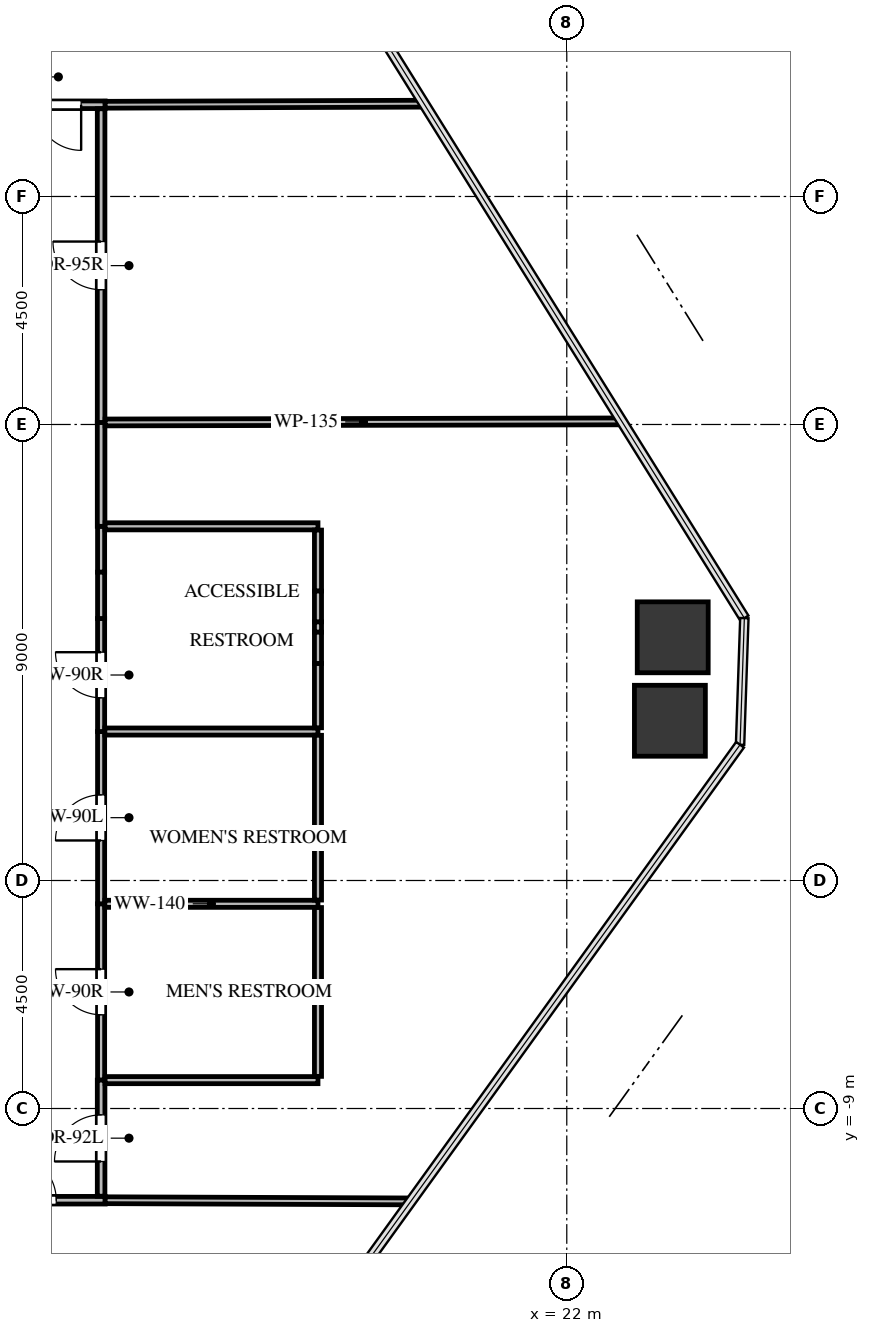
"""IFC4 building model, lengths in metres.
Left out: names, types, materials, properties, quantities, classifications, styles, units other than length and angle.
Written with IfcOpenShell. Run it as: python <this file> out.ifc"""

import sys

from ifc_helpers import new_model, si_unit, direction, frame, frame_2d, origin, origin_2d, place, context, subcontext, project, spatial, rectangle, extrude, source, transform, mapped, element, fill, save


model = new_model("IFC4")
c1 = context("Model", 3, precision=1e-05, world=origin(), true_north=direction((0.0, 1.0)))
c2 = subcontext(c1, "Body", "Model", "MODEL_VIEW")
j1 = project(units=[si_unit("LENGTHUNIT", "METRE"), si_unit("PLANEANGLEUNIT", "RADIAN")], contexts=[c1])
p1 = place(None, origin())
s1 = spatial("IfcSite", under=j1, at=p1, CompositionType="ELEMENT")
p2 = place(p1, origin())
s2 = spatial("IfcBuilding", under=s1, at=p2, CompositionType="ELEMENT")
p3 = place(p2, frame((0.0, 0.0, 39.0)))
s3 = spatial("IfcBuildingStorey", under=s2, at=p3, CompositionType="ELEMENT", Elevation=39.0)
m1 = source(origin(), c2, "Body", "SweptSolid", [
    extrude(rectangle(XDim=1.4, YDim=1.4, at=origin_2d()), origin(), (0.0, 0.0, 1.0), 3.3),
])
for number, where, z_axis, x_axis in (
    (1, (24.091, 0.3, -0.24), (0.0, 0.0, 1.0), (1.0, 0.0, 0.0)),
    (2, (24.035, -1.347, -0.24), (0.0, 0.0, 1.0), (1.0, 0.0, 0.0)),
):
    element("IfcColumn", number, at=place(p3, frame(where, z_axis=z_axis, x_axis=x_axis)), inside=s3, PredefinedType="COLUMN", context=c2, shape_type="MappedRepresentation", body=[
        mapped(m1, transform((0.0, 0.0, 0.0), x_axis=(1.0, 0.0, 0.0), y_axis=(0.0, 1.0, 0.0), z_axis=(0.0, 0.0, 1.0), scale=1.0)),
    ])
p4 = place(p3, frame((12.81, -8.44, 0.0), z_axis=(0.0, 0.0, 1.0), x_axis=(0.0, 1.0, 0.0)))
e3 = element("IfcWall", 3, at=p4, inside=s3, PredefinedType="PARTITIONING", context=c2, shape_type="SweptSolid", body=[
    extrude(rectangle(XDim=3.48, YDim=0.14, at=frame_2d((1.74, 0.0))), origin(), (0.0, 0.0, 1.0), 3.045),
])
p5 = place(p4, frame((1.29, 0.0, 0.0)))
e4 = element("IfcOpeningElement", 4, at=p5, cuts=e3, PredefinedType="OPENING", context=c2, shape_type="SweptSolid", body=[
    extrude(rectangle(XDim=0.9, YDim=2.05, at=frame_2d((0.45, 1.025))), frame((0.0, 0.08, 0.0), z_axis=(0.0, -1.0, 0.0), x_axis=(1.0, 0.0, 0.0)), (0.0, 0.0, 1.0), 0.16),
])
p6 = place(p3, frame((12.81, -4.96, 0.0), z_axis=(0.0, 0.0, 1.0), x_axis=(0.0, 1.0, 0.0)))
e5 = element("IfcWall", 5, at=p6, inside=s3, PredefinedType="PARTITIONING", context=c2, shape_type="SweptSolid", body=[
    extrude(rectangle(XDim=3.4, YDim=0.14, at=frame_2d((1.7, 0.0))), origin(), (0.0, 0.0, 1.0), 3.045),
])
p7 = place(p6, frame((1.25, 0.0, 0.0)))
e6 = element("IfcOpeningElement", 6, at=p7, cuts=e5, PredefinedType="OPENING", context=c2, shape_type="SweptSolid", body=[
    extrude(rectangle(XDim=0.9, YDim=2.05, at=frame_2d((0.45, 1.025))), frame((0.0, 0.08, 0.0), z_axis=(0.0, -1.0, 0.0), x_axis=(1.0, 0.0, 0.0)), (0.0, 0.0, 1.0), 0.16),
])
p8 = place(p3, frame((12.81, -1.56, 0.0), z_axis=(0.0, 0.0, 1.0), x_axis=(0.0, 1.0, 0.0)))
e7 = element("IfcWall", 7, at=p8, inside=s3, PredefinedType="PARTITIONING", context=c2, shape_type="SweptSolid", body=[
    extrude(rectangle(XDim=2.231, YDim=0.14, at=frame_2d((1.116, 0.0))), origin(), (0.0, 0.0, 1.0), 3.045),
])
p9 = place(p8, frame((0.666, 0.0, 0.0)))
e8 = element("IfcOpeningElement", 8, at=p9, cuts=e7, PredefinedType="OPENING", context=c2, shape_type="SweptSolid", body=[
    extrude(rectangle(XDim=0.9, YDim=2.05, at=frame_2d((0.45, 1.025))), frame((0.0, 0.08, 0.0), z_axis=(0.0, -1.0, 0.0), x_axis=(1.0, 0.0, 0.0)), (0.0, 0.0, 1.0), 0.16),
])
p10 = place(p3, frame((12.81, 1.585, 0.0), z_axis=(0.0, 0.0, 1.0), x_axis=(0.0, 1.0, 0.0)))
e9 = element("IfcWall", 9, at=p10, inside=s3, PredefinedType="PARTITIONING", context=c2, shape_type="SweptSolid", body=[
    extrude(rectangle(XDim=0.905, YDim=0.14, at=frame_2d((0.453, 0.0))), origin(), (0.0, 0.0, 1.0), 3.045),
])
p11 = place(p3, frame((12.81, 0.671, 0.0), z_axis=(0.0, 0.0, 1.0), x_axis=(0.0, 1.0, 0.0)))
e10 = element("IfcWall", 10, at=p11, inside=s3, PredefinedType="PARTITIONING", context=c2, shape_type="SweptSolid", body=[
    extrude(rectangle(XDim=0.914, YDim=0.14, at=frame_2d((0.457, 0.0))), origin(), (0.0, 0.0, 1.0), 2.13),
])
p12 = place(p3, frame((12.89, 10.81, 0.0), z_axis=(0.0, 0.0, 1.0), x_axis=(-1.0, 0.0, 0.0)))
e11 = element("IfcWall", 11, at=p12, inside=s3, PredefinedType="PARTITIONING", context=c2, shape_type="SweptSolid", body=[
    extrude(rectangle(XDim=1.847, YDim=0.15, at=frame_2d((0.924, 0.0))), origin(), (0.0, 0.0, 1.0), 3.045),
])
p13 = place(p12, frame((0.474, 0.0, 0.0)))
e12 = element("IfcOpeningElement", 12, at=p13, cuts=e11, PredefinedType="OPENING", context=c2, shape_type="SweptSolid", body=[
    extrude(rectangle(XDim=0.9, YDim=2.05, at=frame_2d((0.45, 1.025))), frame((0.0, 0.085, 0.0), z_axis=(0.0, -1.0, 0.0), x_axis=(1.0, 0.0, 0.0)), (0.0, 0.0, 1.0), 0.17),
])
p14 = place(p3, frame((10.04, -10.81, 0.0), z_axis=(0.0, 0.0, 1.0), x_axis=(1.0, 0.0, 0.0)))
e13 = element("IfcWall", 13, at=p14, inside=s3, PredefinedType="PARTITIONING", context=c2, shape_type="SweptSolid", body=[
    extrude(rectangle(XDim=2.85, YDim=0.15, at=frame_2d((1.425, 0.0))), origin(), (0.0, 0.0, 1.0), 3.045),
])
p15 = place(p14, frame((0.965, 0.0, 0.0)))
e14 = element("IfcOpeningElement", 14, at=p15, cuts=e13, PredefinedType="OPENING", context=c2, shape_type="SweptSolid", body=[
    extrude(rectangle(XDim=0.92, YDim=2.1, at=frame_2d((0.46, 1.05))), frame((0.0, 0.085, 0.0), z_axis=(0.0, -1.0, 0.0), x_axis=(1.0, 0.0, 0.0)), (0.0, 0.0, 1.0), 0.17),
])
p16 = place(p3, frame((12.81, -10.731, 0.0), z_axis=(0.0, 0.0, 1.0), x_axis=(0.0, 1.0, 0.0)))
e15 = element("IfcWall", 15, at=p16, inside=s3, PredefinedType="PARTITIONING", context=c2, shape_type="SweptSolid", body=[
    extrude(rectangle(XDim=2.291, YDim=0.15, at=frame_2d((1.146, 0.0))), origin(), (0.0, 0.0, 1.0), 3.045),
])
p17 = place(p16, frame((0.686, 0.0, 0.0)))
e16 = element("IfcOpeningElement", 16, at=p17, cuts=e15, PredefinedType="OPENING", context=c2, shape_type="SweptSolid", body=[
    extrude(rectangle(XDim=0.92, YDim=2.1, at=frame_2d((0.46, 1.05))), frame((0.0, 0.085, 0.0), z_axis=(0.0, -1.0, 0.0), x_axis=(1.0, 0.0, 0.0)), (0.0, 0.0, 1.0), 0.17),
])
p18 = place(p3, frame((12.81, 2.49, 0.0), z_axis=(0.0, 0.0, 1.0), x_axis=(0.0, 1.0, 0.0)))
e17 = element("IfcWall", 17, at=p18, inside=s3, PredefinedType="PARTITIONING", context=c2, shape_type="SweptSolid", body=[
    extrude(rectangle(XDim=2.05, YDim=0.15, at=frame_2d((1.025, 0.0))), origin(), (0.0, 0.0, 1.0), 3.045),
])
p19 = place(p3, frame((12.81, 4.54, 0.0), z_axis=(0.0, 0.0, 1.0), x_axis=(0.0, 1.0, 0.0)))
e18 = element("IfcWall", 18, at=p19, inside=s3, PredefinedType="PARTITIONING", context=c2, shape_type="SweptSolid", body=[
    extrude(rectangle(XDim=6.191, YDim=0.15, at=frame_2d((3.095, 0.0))), origin(), (0.0, 0.0, 1.0), 3.045),
])
p20 = place(p19, frame((2.621, 0.0, 0.0)))
e19 = element("IfcOpeningElement", 19, at=p20, cuts=e18, PredefinedType="OPENING", context=c2, shape_type="SweptSolid", body=[
    extrude(rectangle(XDim=0.95, YDim=2.1, at=frame_2d((0.475, 1.05))), frame((0.0, 0.085, 0.0), z_axis=(0.0, -1.0, 0.0), x_axis=(1.0, 0.0, 0.0)), (0.0, 0.0, 1.0), 0.17),
])
p21 = place(p3, frame((12.884, -4.96, 0.0), z_axis=(0.0, 0.0, 1.0), x_axis=(1.0, 0.0, 0.0)))
e20 = element("IfcWall", 20, at=p21, inside=s3, PredefinedType="PARTITIONING", context=c2, shape_type="SweptSolid", body=[
    extrude(rectangle(XDim=4.206, YDim=0.14, at=frame_2d((2.103, 0.0))), origin(), (0.0, 0.0, 1.0), 3.045),
])
p22 = place(p3, frame((17.09, -8.44, 0.0), z_axis=(0.0, 0.0, 1.0), x_axis=(-1.0, 0.0, 0.0)))
e21 = element("IfcWall", 21, at=p22, inside=s3, PredefinedType="PARTITIONING", context=c2, shape_type="SweptSolid", body=[
    extrude(rectangle(XDim=4.201, YDim=0.14, at=frame_2d((2.101, 0.0))), origin(), (0.0, 0.0, 1.0), 3.045),
])
p23 = place(p3, frame((17.09, -5.034, 0.0), z_axis=(0.0, 0.0, 1.0), x_axis=(0.0, -1.0, 0.0)))
e22 = element("IfcWall", 22, at=p23, inside=s3, PredefinedType="PARTITIONING", context=c2, shape_type="SweptSolid", body=[
    extrude(rectangle(XDim=3.332, YDim=0.14, at=frame_2d((1.666, 0.0))), origin(), (0.0, 0.0, 1.0), 3.045),
])
p24 = place(p3, frame((12.884, -1.56, 0.0), z_axis=(0.0, 0.0, 1.0), x_axis=(1.0, 0.0, 0.0)))
e23 = element("IfcWall", 23, at=p24, inside=s3, PredefinedType="PARTITIONING", context=c2, shape_type="SweptSolid", body=[
    extrude(rectangle(XDim=4.206, YDim=0.14, at=frame_2d((2.103, 0.0))), origin(), (0.0, 0.0, 1.0), 3.045),
])
p25 = place(p3, frame((17.09, -1.634, 0.0), z_axis=(0.0, 0.0, 1.0), x_axis=(0.0, -1.0, 0.0)))
e24 = element("IfcWall", 24, at=p25, inside=s3, PredefinedType="PARTITIONING", context=c2, shape_type="SweptSolid", body=[
    extrude(rectangle(XDim=3.252, YDim=0.14, at=frame_2d((1.626, 0.0))), origin(), (0.0, 0.0, 1.0), 3.045),
])
p26 = place(p3, frame((12.889, 2.49, 0.0), z_axis=(0.0, 0.0, 1.0), x_axis=(1.0, 0.0, 0.0)))
e25 = element("IfcWall", 25, at=p26, inside=s3, PredefinedType="PARTITIONING", context=c2, shape_type="SweptSolid", body=[
    extrude(rectangle(XDim=4.201, YDim=0.14, at=frame_2d((2.101, 0.0))), origin(), (0.0, 0.0, 1.0), 3.045),
])
p27 = place(p3, frame((17.09, 2.416, 0.0), z_axis=(0.0, 0.0, 1.0), x_axis=(0.0, -1.0, 0.0)))
e26 = element("IfcWall", 26, at=p27, inside=s3, PredefinedType="PARTITIONING", context=c2, shape_type="SweptSolid", body=[
    extrude(rectangle(XDim=1.204, YDim=0.14, at=frame_2d((0.602, 0.0))), origin(), (0.0, 0.0, 1.0), 3.045),
])
p28 = place(p3, frame((17.09, 0.606, 0.0), z_axis=(0.0, 0.0, 1.0), x_axis=(0.0, -1.0, 0.0)))
e27 = element("IfcWall", 27, at=p28, inside=s3, PredefinedType="PARTITIONING", context=c2, shape_type="SweptSolid", body=[
    extrude(rectangle(XDim=0.205, YDim=0.14, at=frame_2d((0.103, 0.0))), origin(), (0.0, 0.0, 1.0), 3.045),
])
p29 = place(p3, frame((17.09, -0.216, 0.0), z_axis=(0.0, 0.0, 1.0), x_axis=(0.0, -1.0, 0.0)))
e28 = element("IfcWall", 28, at=p29, inside=s3, PredefinedType="PARTITIONING", context=c2, shape_type="SweptSolid", body=[
    extrude(rectangle(XDim=1.27, YDim=0.14, at=frame_2d((0.635, 0.0))), origin(), (0.0, 0.0, 1.0), 3.045),
])
p30 = place(p3, frame((17.09, 1.212, 0.0), z_axis=(0.0, 0.0, 1.0), x_axis=(0.0, -1.0, 0.0)))
e29 = element("IfcWall", 29, at=p30, inside=s3, PredefinedType="PARTITIONING", context=c2, shape_type="SweptSolid", body=[
    extrude(rectangle(XDim=0.606, YDim=0.14, at=frame_2d((0.303, 0.0))), origin(), (0.0, 0.0, 1.0), 2.13),
])
p31 = place(p3, frame((17.09, 0.401, 0.0), z_axis=(0.0, 0.0, 1.0), x_axis=(0.0, -1.0, 0.0)))
e30 = element("IfcWall", 30, at=p31, inside=s3, PredefinedType="PARTITIONING", context=c2, shape_type="SweptSolid", body=[
    extrude(rectangle(XDim=0.617, YDim=0.14, at=frame_2d((0.309, 0.0))), origin(), (0.0, 0.0, 1.0), 2.13),
])
p32 = place(p3, frame((19.182, 10.831, 0.0), z_axis=(0.0, 0.0, 1.0), x_axis=(-0.999994432845, -0.003336806783, 0.0)))
e31 = element("IfcWall", 31, at=p32, inside=s3, PredefinedType="PARTITIONING", context=c2, shape_type="SweptSolid", body=[
    extrude(rectangle(XDim=6.292, YDim=0.135, at=frame_2d((3.146, 0.0))), origin(), (0.0, 0.0, 1.0), 2.38),
])
p33 = place(p3, frame((12.89, -10.81, 0.0), z_axis=(0.0, 0.0, 1.0), x_axis=(0.999992607823, -0.003845035728, 0.0)))
e32 = element("IfcWall", 32, at=p33, inside=s3, PredefinedType="PARTITIONING", context=c2, shape_type="SweptSolid", body=[
    extrude(rectangle(XDim=6.032, YDim=0.135, at=frame_2d((3.016, 0.0))), origin(), (0.0, 0.0, 1.0), 2.38),
])
p34 = place(p3, frame((12.889, 4.54, 0.0), z_axis=(0.0, 0.0, 1.0), x_axis=(0.99999792939, 0.002034997821, 0.0)))
e33 = element("IfcWall", 33, at=p34, inside=s3, PredefinedType="PARTITIONING", context=c2, shape_type="SweptSolid", body=[
    extrude(rectangle(XDim=10.198, YDim=0.135, at=frame_2d((5.099, 0.0))), origin(), (0.0, 0.0, 1.0), 2.38),
])
m2 = source(origin(), c2, "Body", "SweptSolid", [
    extrude(rectangle(XDim=0.9, YDim=2.05, at=frame_2d((0.45, 1.025))), frame((0.0, 0.025, 0.0), z_axis=(0.0, -1.0, 0.0), x_axis=(1.0, 0.0, 0.0)), (0.0, 0.0, 1.0), 0.05),
])
p35 = place(p5, origin())
e34 = element("IfcDoor", 34, at=p35, inside=s3, OperationType="SINGLE_SWING_RIGHT", PredefinedType="DOOR", context=c2, shape_type="MappedRepresentation", body=[
    mapped(m2, transform((0.0, 0.0, 0.0), x_axis=(1.0, 0.0, 0.0), y_axis=(0.0, 1.0, 0.0), z_axis=(0.0, 0.0, 1.0), scale=1.0)),
])
fill(e4, e34)
m3 = source(origin(), c2, "Body", "SweptSolid", [
    extrude(rectangle(XDim=0.9, YDim=2.05, at=frame_2d((0.45, 1.025))), frame((0.0, 0.025, 0.0), z_axis=(0.0, -1.0, 0.0), x_axis=(1.0, 0.0, 0.0)), (0.0, 0.0, 1.0), 0.05),
])
p36 = place(p7, origin())
e35 = element("IfcDoor", 35, at=p36, inside=s3, OperationType="SINGLE_SWING_LEFT", PredefinedType="DOOR", context=c2, shape_type="MappedRepresentation", body=[
    mapped(m3, transform((0.0, 0.0, 0.0), x_axis=(1.0, 0.0, 0.0), y_axis=(0.0, 1.0, 0.0), z_axis=(0.0, 0.0, 1.0), scale=1.0)),
])
fill(e6, e35)
p37 = place(p9, origin())
e36 = element("IfcDoor", 36, at=p37, inside=s3, OperationType="SINGLE_SWING_RIGHT", PredefinedType="DOOR", context=c2, shape_type="MappedRepresentation", body=[
    mapped(m2, transform((0.0, 0.0, 0.0), x_axis=(1.0, 0.0, 0.0), y_axis=(0.0, 1.0, 0.0), z_axis=(0.0, 0.0, 1.0), scale=1.0)),
])
fill(e8, e36)
p38 = place(p13, origin())
e37 = element("IfcDoor", 37, at=p38, inside=s3, OperationType="SINGLE_SWING_LEFT", PredefinedType="DOOR", context=c2, shape_type="MappedRepresentation", body=[
    mapped(m3, transform((0.0, 0.0, 0.0), x_axis=(1.0, 0.0, 0.0), y_axis=(0.0, 1.0, 0.0), z_axis=(0.0, 0.0, 1.0), scale=1.0)),
])
fill(e12, e37)
m4 = source(origin(), c2, "Body", "SweptSolid", [
    extrude(rectangle(XDim=0.92, YDim=2.1, at=frame_2d((0.46, 1.05))), frame((0.0, 0.025, 0.0), z_axis=(0.0, -1.0, 0.0), x_axis=(1.0, 0.0, 0.0)), (0.0, 0.0, 1.0), 0.05),
])
p39 = place(p15, origin())
e38 = element("IfcDoor", 38, at=p39, inside=s3, OperationType="SINGLE_SWING_LEFT", PredefinedType="DOOR", context=c2, shape_type="MappedRepresentation", body=[
    mapped(m4, transform((0.0, 0.0, 0.0), x_axis=(1.0, 0.0, 0.0), y_axis=(0.0, 1.0, 0.0), z_axis=(0.0, 0.0, 1.0), scale=1.0)),
])
fill(e14, e38)
p40 = place(p17, origin())
e39 = element("IfcDoor", 39, at=p40, inside=s3, OperationType="SINGLE_SWING_LEFT", PredefinedType="DOOR", context=c2, shape_type="MappedRepresentation", body=[
    mapped(m4, transform((0.0, 0.0, 0.0), x_axis=(1.0, 0.0, 0.0), y_axis=(0.0, 1.0, 0.0), z_axis=(0.0, 0.0, 1.0), scale=1.0)),
])
fill(e16, e39)
m5 = source(origin(), c2, "Body", "SweptSolid", [
    extrude(rectangle(XDim=0.95, YDim=2.1, at=frame_2d((0.475, 1.05))), frame((0.0, 0.025, 0.0), z_axis=(0.0, -1.0, 0.0), x_axis=(1.0, 0.0, 0.0)), (0.0, 0.0, 1.0), 0.05),
])
p41 = place(p20, origin())
e40 = element("IfcDoor", 40, at=p41, inside=s3, OperationType="SINGLE_SWING_RIGHT", PredefinedType="DOOR", context=c2, shape_type="MappedRepresentation", body=[
    mapped(m5, transform((0.0, 0.0, 0.0), x_axis=(1.0, 0.0, 0.0), y_axis=(0.0, 1.0, 0.0), z_axis=(0.0, 0.0, 1.0), scale=1.0)),
])
fill(e19, e40)
save(model, sys.argv[1])
